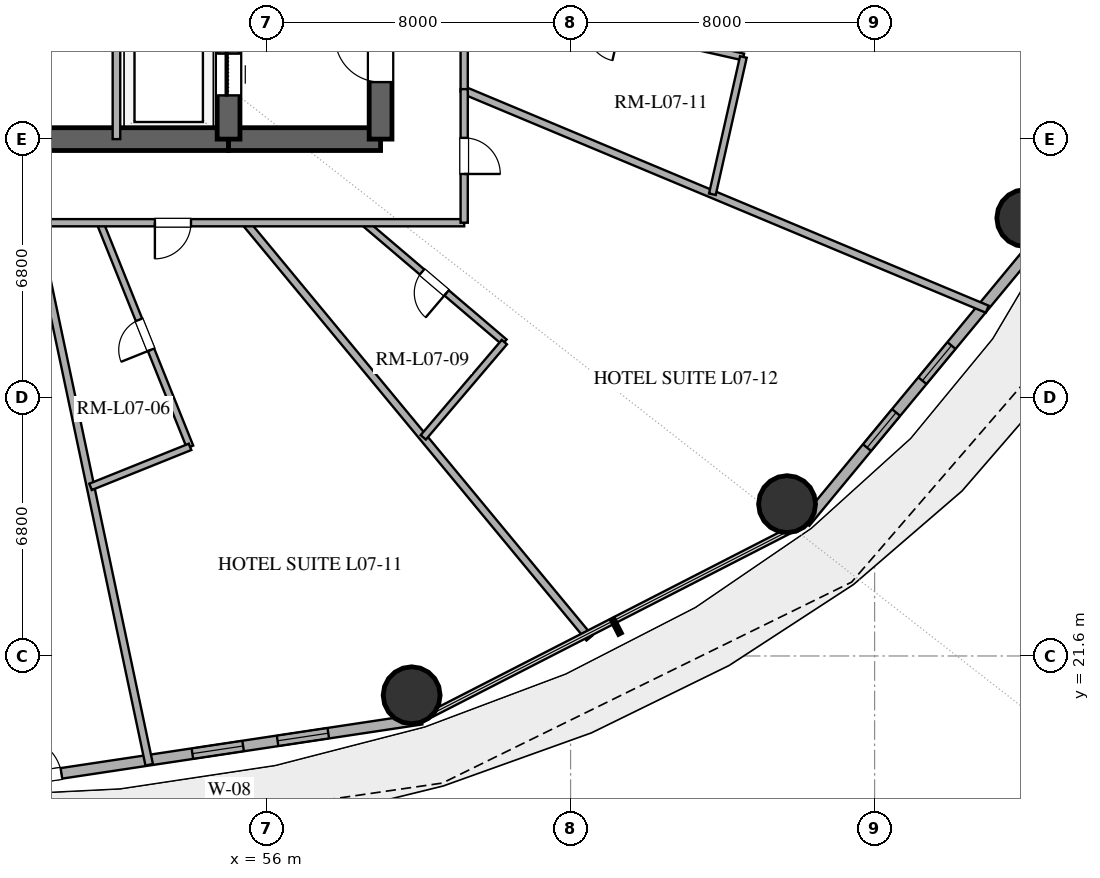
"""IFC4 building model, lengths in metres.
Left out: names, types, materials, properties, quantities, classifications, styles, units other than length and angle.
Written with IfcOpenShell. Run it as: python <this file> out.ifc"""

import sys

from ifc_helpers import new_model, si_unit, direction, frame, frame_2d, origin, origin_2d, place, context, subcontext, project, spatial, rectangle, hollow_circle, extrude, element, fill, save


model = new_model("IFC4")
c1 = context("Model", 3, precision=1e-05, world=origin(), true_north=direction((0.0, 1.0)))
c2 = subcontext(c1, "Body", "Model", "MODEL_VIEW")
j1 = project(units=[si_unit("LENGTHUNIT", "METRE"), si_unit("PLANEANGLEUNIT", "RADIAN")], contexts=[c1])
p1 = place(None, origin())
s1 = spatial("IfcSite", under=j1, at=p1, CompositionType="ELEMENT")
p2 = place(p1, origin())
s2 = spatial("IfcBuilding", under=s1, at=p2, CompositionType="ELEMENT")
p3 = place(p2, frame((0.0, 0.0, 35.4)))
s3 = spatial("IfcBuildingStorey", under=s2, at=p3, CompositionType="ELEMENT", Elevation=35.4)
p4 = place(p3, frame((41.0, 35.2, 0.0), z_axis=(0.0, 0.0, 1.0), x_axis=(1.0, 0.0, 0.0)))
e1 = element("IfcWall", 1, at=p4, inside=s3, PredefinedType="SHEAR", context=c2, shape_type="SweptSolid", body=[
    extrude(rectangle(XDim=14.0, YDim=0.6, at=frame_2d((7.0, 0.0))), origin(), (0.0, 0.0, 1.0), 3.38),
])
p5 = place(p4, frame((6.1, 0.0, 0.0)))
e2 = element("IfcOpeningElement", 2, at=p5, cuts=e1, PredefinedType="OPENING", context=c2, shape_type="SweptSolid", body=[
    extrude(rectangle(XDim=1.8, YDim=2.25, at=frame_2d((0.9, 1.125))), frame((0.0, 0.31, 0.0), z_axis=(0.0, -1.0, 0.0), x_axis=(1.0, 0.0, 0.0)), (0.0, 0.0, 1.0), 0.62),
])
p6 = place(p3, frame((55.0, 35.2, 0.0), z_axis=(0.0, 0.0, 1.0), x_axis=(1.0, 0.0, 0.0)))
e3 = element("IfcWall", 3, at=p6, inside=s3, PredefinedType="SHEAR", context=c2, shape_type="SweptSolid", body=[
    extrude(rectangle(XDim=4.0, YDim=0.6, at=frame_2d((2.0, 0.0))), origin(), (0.0, 0.0, 1.0), 3.38),
])
p7 = place(p3, frame((59.0, 35.2, 0.0), z_axis=(0.0, 0.0, 1.0), x_axis=(0.0, 1.0, 0.0)))
e4 = element("IfcWall", 4, at=p7, inside=s3, PredefinedType="SHEAR", context=c2, shape_type="SweptSolid", body=[
    extrude(rectangle(XDim=13.6, YDim=0.6, at=frame_2d((6.8, 0.0))), origin(), (0.0, 0.0, 1.0), 3.38),
])
p8 = place(p7, frame((1.5, 0.0, 0.0)))
e5 = element("IfcOpeningElement", 5, at=p8, cuts=e4, PredefinedType="OPENING", context=c2, shape_type="SweptSolid", body=[
    extrude(rectangle(XDim=1.2, YDim=2.15, at=frame_2d((0.6, 1.075))), frame((0.0, 0.31, 0.0), z_axis=(0.0, -1.0, 0.0), x_axis=(1.0, 0.0, 0.0)), (0.0, 0.0, 1.0), 0.62),
])
p9 = place(p3, frame((55.0, 35.2, 0.0), z_axis=(0.0, 0.0, 1.0), x_axis=(0.0, 1.0, 0.0)))
e6 = element("IfcWall", 6, at=p9, inside=s3, PredefinedType="SHEAR", context=c2, shape_type="SweptSolid", body=[
    extrude(rectangle(XDim=13.6, YDim=0.6, at=frame_2d((6.8, 0.0))), origin(), (0.0, 0.0, 1.0), 3.38),
])
p10 = place(p9, frame((1.15, 0.0, 0.0)))
e7 = element("IfcOpeningElement", 7, at=p10, cuts=e6, PredefinedType="OPENING", context=c2, shape_type="SweptSolid", body=[
    extrude(rectangle(XDim=1.1, YDim=2.2, at=frame_2d((0.55, 1.1))), frame((0.0, 0.31, 0.0), z_axis=(0.0, -1.0, 0.0), x_axis=(1.0, 0.0, 0.0)), (0.0, 0.0, 1.0), 0.62),
])
for number, where, z_axis, x_axis in (
    (8, (59.818, 20.566, 0.0), (0.0, 0.0, 1.0), (1.0, 0.0, 0.0)),
    (9, (69.697, 25.595, 0.0), (0.0, 0.0, 1.0), (1.0, 0.0, 0.0)),
    (10, (75.966, 33.122, 0.0), (0.0, 0.0, 1.0), (1.0, 0.0, 0.0)),
):
    element("IfcColumn", number, at=place(p3, frame(where, z_axis=z_axis, x_axis=x_axis)), inside=s3, PredefinedType="COLUMN", context=c2, shape_type="SweptSolid", body=[
        extrude(hollow_circle(Radius=0.75, WallThickness=0.04, at=origin_2d()), origin(), (0.0, 0.0, 1.0), 3.38),
    ])
p11 = place(p3, frame((48.0, 18.12, 0.0), z_axis=(0.0, 0.0, 1.0), x_axis=(0.988864835849, 0.148816452121, 0.0)))
e11 = element("IfcWall", 11, at=p11, inside=s3, PredefinedType="SOLIDWALL", context=c2, shape_type="SweptSolid", body=[
    extrude(rectangle(XDim=12.214, YDim=0.28, at=frame_2d((6.107, 0.0))), origin(), (0.0, 0.0, 1.0), 3.38),
])
p12 = place(p11, frame((1.531, 0.0, 0.0)))
e12 = element("IfcOpeningElement", 12, at=p12, cuts=e11, PredefinedType="OPENING", context=c2, shape_type="SweptSolid", body=[
    extrude(rectangle(XDim=1.1, YDim=2.25, at=frame_2d((0.55, 1.125))), frame((0.0, 0.15, 0.0), z_axis=(0.0, -1.0, 0.0), x_axis=(1.0, 0.0, 0.0)), (0.0, 0.0, 1.0), 0.3),
])
p13 = place(p11, frame((6.116, 0.0, 0.85)))
e13 = element("IfcOpeningElement", 13, at=p13, cuts=e11, PredefinedType="OPENING", context=c2, shape_type="SweptSolid", body=[
    extrude(rectangle(XDim=1.35, YDim=1.8, at=frame_2d((0.675, 0.9))), frame((0.0, 0.15, 0.0), z_axis=(0.0, -1.0, 0.0), x_axis=(1.0, 0.0, 0.0)), (0.0, 0.0, 1.0), 0.3),
])
p14 = place(p11, frame((8.383, 0.0, 0.85)))
e14 = element("IfcOpeningElement", 14, at=p14, cuts=e11, PredefinedType="OPENING", context=c2, shape_type="SweptSolid", body=[
    extrude(rectangle(XDim=1.35, YDim=1.8, at=frame_2d((0.675, 0.9))), frame((0.0, 0.15, 0.0), z_axis=(0.0, -1.0, 0.0), x_axis=(1.0, 0.0, 0.0)), (0.0, 0.0, 1.0), 0.3),
])
p15 = place(p3, frame((70.174, 25.114, 0.0), z_axis=(0.0, 0.0, 1.0), x_axis=(0.637296809613, 0.770618437657, 0.0)))
e15 = element("IfcWall", 15, at=p15, inside=s3, PredefinedType="SOLIDWALL", context=c2, shape_type="SweptSolid", body=[
    extrude(rectangle(XDim=10.053, YDim=0.28, at=frame_2d((5.027, 0.0))), origin(), (0.0, 0.0, 1.0), 3.38),
])
p16 = place(p15, frame((2.553, 0.0, 0.85)))
e16 = element("IfcOpeningElement", 16, at=p16, cuts=e15, PredefinedType="OPENING", context=c2, shape_type="SweptSolid", body=[
    extrude(rectangle(XDim=1.2, YDim=1.8, at=frame_2d((0.6, 0.9))), frame((0.0, 0.15, 0.0), z_axis=(0.0, -1.0, 0.0), x_axis=(1.0, 0.0, 0.0)), (0.0, 0.0, 1.0), 0.3),
])
p17 = place(p15, frame((4.839, 0.0, 0.85)))
e17 = element("IfcOpeningElement", 17, at=p17, cuts=e15, PredefinedType="OPENING", context=c2, shape_type="SweptSolid", body=[
    extrude(rectangle(XDim=1.2, YDim=1.8, at=frame_2d((0.6, 0.9))), frame((0.0, 0.15, 0.0), z_axis=(0.0, -1.0, 0.0), x_axis=(1.0, 0.0, 0.0)), (0.0, 0.0, 1.0), 0.3),
])
p18 = place(p3, frame((52.05, 35.2, 0.0), z_axis=(0.0, 0.0, 1.0), x_axis=(0.0, 1.0, 0.0)))
e18 = element("IfcWall", 18, at=p18, inside=s3, PredefinedType="SOLIDWALL", context=c2, shape_type="SweptSolid", body=[
    extrude(rectangle(XDim=3.2, YDim=0.2, at=frame_2d((1.6, 0.0))), origin(), (0.0, 0.0, 1.0), 2.74),
])
p19 = place(p3, frame((61.2, 36.48, 0.0), z_axis=(0.0, 0.0, 1.0), x_axis=(0.922585702004, -0.385792201136, 0.0)))
e19 = element("IfcWall", 19, at=p19, inside=s3, PredefinedType="PARTITIONING", context=c2, shape_type="SweptSolid", body=[
    extrude(rectangle(XDim=14.918, YDim=0.2, at=frame_2d((7.459, 0.0))), origin(), (0.0, 0.0, 1.0), 2.74),
])
p20 = place(p3, frame((68.547, 37.361, 0.0), z_axis=(0.0, 0.0, 1.0), x_axis=(-0.975442349969, 0.220254902072, 0.0)))
e20 = element("IfcWall", 20, at=p20, inside=s3, PredefinedType="PLUMBINGWALL", context=c2, shape_type="SweptSolid", body=[
    extrude(rectangle(XDim=7.532, YDim=0.18, at=frame_2d((3.766, 0.0))), origin(), (0.0, 0.0, 1.0), 2.74),
])
p21 = place(p20, frame((3.341, 0.0, 0.0)))
e21 = element("IfcOpeningElement", 21, at=p21, cuts=e20, PredefinedType="OPENING", context=c2, shape_type="SweptSolid", body=[
    extrude(rectangle(XDim=0.85, YDim=2.1, at=frame_2d((0.425, 1.05))), frame((0.0, 0.1, 0.0), z_axis=(0.0, -1.0, 0.0), x_axis=(1.0, 0.0, 0.0)), (0.0, 0.0, 1.0), 0.2),
])
p22 = place(p3, frame((49.9, 33.0, 0.0), z_axis=(0.0, 0.0, 1.0), x_axis=(0.206598790959, -0.97842574556, 0.0)))
e22 = element("IfcWall", 22, at=p22, inside=s3, PredefinedType="PARTITIONING", context=c2, shape_type="SweptSolid", body=[
    extrude(rectangle(XDim=14.576, YDim=0.2, at=frame_2d((7.288, 0.0))), origin(), (0.0, 0.0, 1.0), 2.74),
])
p23 = place(p3, frame((61.2, 51.0, 0.0), z_axis=(0.0, 0.0, 1.0), x_axis=(0.0, -1.0, 0.0)))
e23 = element("IfcWall", 23, at=p23, inside=s3, PredefinedType="PARTITIONING", context=c2, shape_type="SweptSolid", body=[
    extrude(rectangle(XDim=14.554, YDim=0.19, at=frame_2d((7.277, 0.0))), origin(), (0.0, 0.0, 1.0), 2.74),
])
p24 = place(p23, frame((3.684, 0.0, 0.0)))
e24 = element("IfcOpeningElement", 24, at=p24, cuts=e23, PredefinedType="OPENING", context=c2, shape_type="SweptSolid", body=[
    extrude(rectangle(XDim=1.0, YDim=2.2, at=frame_2d((0.5, 1.1))), frame((0.0, 0.105, 0.0), z_axis=(0.0, -1.0, 0.0), x_axis=(1.0, 0.0, 0.0)), (0.0, 0.0, 1.0), 0.21),
])
p25 = place(p23, frame((9.438, 0.0, 0.0)))
e25 = element("IfcOpeningElement", 25, at=p25, cuts=e23, PredefinedType="OPENING", context=c2, shape_type="SweptSolid", body=[
    extrude(rectangle(XDim=0.95, YDim=2.15, at=frame_2d((0.475, 1.075))), frame((0.0, 0.105, 0.0), z_axis=(0.0, -1.0, 0.0), x_axis=(1.0, 0.0, 0.0)), (0.0, 0.0, 1.0), 0.21),
])
p26 = place(p3, frame((55.449, 33.0, 0.0), z_axis=(0.0, 0.0, 1.0), x_axis=(0.637638501905, -0.770335732579, 0.0)))
e26 = element("IfcWall", 26, at=p26, inside=s3, PredefinedType="PARTITIONING", context=c2, shape_type="SweptSolid", body=[
    extrude(rectangle(XDim=14.187, YDim=0.2, at=frame_2d((7.094, 0.0))), origin(), (0.0, 0.0, 1.0), 2.74),
])
p27 = place(p3, frame((53.987, 27.102, 0.0), z_axis=(0.0, 0.0, 1.0), x_axis=(-0.37285379951, 0.927890103509, 0.0)))
e27 = element("IfcWall", 27, at=p27, inside=s3, PredefinedType="PLUMBINGWALL", context=c2, shape_type="SweptSolid", body=[
    extrude(rectangle(XDim=6.356, YDim=0.18, at=frame_2d((3.178, 0.0))), origin(), (0.0, 0.0, 1.0), 2.74),
])
p28 = place(p27, frame((2.753, 0.0, 0.0)))
e28 = element("IfcOpeningElement", 28, at=p28, cuts=e27, PredefinedType="OPENING", context=c2, shape_type="SweptSolid", body=[
    extrude(rectangle(XDim=0.85, YDim=2.1, at=frame_2d((0.425, 1.05))), frame((0.0, 0.1, 0.0), z_axis=(0.0, -1.0, 0.0), x_axis=(1.0, 0.0, 0.0)), (0.0, 0.0, 1.0), 0.2),
])
p29 = place(p3, frame((62.258, 29.859, 0.0), z_axis=(0.0, 0.0, 1.0), x_axis=(-0.761358380859, 0.648331254758, 0.0)))
e29 = element("IfcWall", 29, at=p29, inside=s3, PredefinedType="PLUMBINGWALL", context=c2, shape_type="SweptSolid", body=[
    extrude(rectangle(XDim=4.845, YDim=0.18, at=frame_2d((2.422, 0.0))), origin(), (0.0, 0.0, 1.0), 2.74),
])
p30 = place(p29, frame((1.997, 0.0, 0.0)))
e30 = element("IfcOpeningElement", 30, at=p30, cuts=e29, PredefinedType="OPENING", context=c2, shape_type="SweptSolid", body=[
    extrude(rectangle(XDim=0.85, YDim=2.1, at=frame_2d((0.425, 1.05))), frame((0.0, 0.1, 0.0), z_axis=(0.0, -1.0, 0.0), x_axis=(1.0, 0.0, 0.0)), (0.0, 0.0, 1.0), 0.2),
])
p31 = place(p3, frame((61.2, 33.0, 0.0), z_axis=(0.0, 0.0, 1.0), x_axis=(-1.0, 0.0, 0.0)))
e31 = element("IfcWall", 31, at=p31, inside=s3, PredefinedType="PARTITIONING", context=c2, shape_type="SweptSolid", body=[
    extrude(rectangle(XDim=11.3, YDim=0.19, at=frame_2d((5.65, 0.0))), origin(), (0.0, 0.0, 1.0), 2.74),
])
p32 = place(p31, frame((7.188, 0.0, 0.0)))
e32 = element("IfcOpeningElement", 32, at=p32, cuts=e31, PredefinedType="OPENING", context=c2, shape_type="SweptSolid", body=[
    extrude(rectangle(XDim=0.95, YDim=2.15, at=frame_2d((0.475, 1.075))), frame((0.0, 0.105, 0.0), z_axis=(0.0, -1.0, 0.0), x_axis=(1.0, 0.0, 0.0)), (0.0, 0.0, 1.0), 0.21),
])
p33 = place(p3, frame((67.731, 33.749, 0.0), z_axis=(0.0, 0.0, 1.0), x_axis=(0.220238608567, 0.9754460289, 0.0)))
e33 = element("IfcWall", 33, at=p33, inside=s3, PredefinedType="PLUMBINGWALL", context=c2, shape_type="SweptSolid", body=[
    extrude(rectangle(XDim=3.702, YDim=0.18, at=frame_2d((1.851, 0.0))), origin(), (0.0, 0.0, 1.0), 2.74),
])
p34 = place(p3, frame((61.2, 36.515, 0.0), z_axis=(0.0, 0.0, 1.0), x_axis=(0.0, -1.0, 0.0)))
e34 = element("IfcWall", 34, at=p34, inside=s3, PredefinedType="PARTITIONING", context=c2, shape_type="SweptSolid", body=[
    extrude(rectangle(XDim=3.515, YDim=0.19, at=frame_2d((1.758, 0.0))), origin(), (0.0, 0.0, 1.0), 2.74),
])
p35 = place(p34, frame((1.282, 0.0, 0.0)))
e35 = element("IfcOpeningElement", 35, at=p35, cuts=e34, PredefinedType="OPENING", context=c2, shape_type="SweptSolid", body=[
    extrude(rectangle(XDim=0.95, YDim=2.15, at=frame_2d((0.475, 1.075))), frame((0.0, 0.105, 0.0), z_axis=(0.0, -1.0, 0.0), x_axis=(1.0, 0.0, 0.0)), (0.0, 0.0, 1.0), 0.21),
])
p36 = place(p3, frame((60.124, 27.353, 0.0), z_axis=(0.0, 0.0, 1.0), x_axis=(0.648326357453, 0.76136255111, 0.0)))
e36 = element("IfcWall", 36, at=p36, inside=s3, PredefinedType="PLUMBINGWALL", context=c2, shape_type="SweptSolid", body=[
    extrude(rectangle(XDim=3.292, YDim=0.18, at=frame_2d((1.646, 0.0))), origin(), (0.0, 0.0, 1.0), 2.74),
])
p37 = place(p3, frame((51.368, 26.05, 0.0), z_axis=(0.0, 0.0, 1.0), x_axis=(0.927890861741, 0.372851912558, 0.0)))
e37 = element("IfcWall", 37, at=p37, inside=s3, PredefinedType="PLUMBINGWALL", context=c2, shape_type="SweptSolid", body=[
    extrude(rectangle(XDim=2.822, YDim=0.18, at=frame_2d((1.411, 0.0))), origin(), (0.0, 0.0, 1.0), 2.74),
])
p38 = place(p12, origin())
e38 = element("IfcDoor", 38, at=p38, inside=s3, OperationType="SINGLE_SWING_LEFT", PredefinedType="DOOR", context=c2, shape_type="SweptSolid", body=[
    extrude(rectangle(XDim=1.1, YDim=2.25, at=frame_2d((0.55, 1.125))), frame((0.0, 0.025, 0.0), z_axis=(0.0, -1.0, 0.0), x_axis=(1.0, 0.0, 0.0)), (0.0, 0.0, 1.0), 0.05),
])
fill(e12, e38)
p39 = place(p13, origin())
e39 = element("IfcWindow", 39, at=p39, inside=s3, PartitioningType="SINGLE_PANEL", PredefinedType="WINDOW", context=c2, shape_type="SweptSolid", body=[
    extrude(rectangle(XDim=1.35, YDim=1.8, at=frame_2d((0.675, 0.9))), frame((0.0, 0.03, 0.0), z_axis=(0.0, -1.0, 0.0), x_axis=(1.0, 0.0, 0.0)), (0.0, 0.0, 1.0), 0.06),
])
fill(e13, e39)
p40 = place(p14, origin())
e40 = element("IfcWindow", 40, at=p40, inside=s3, PartitioningType="SINGLE_PANEL", PredefinedType="WINDOW", context=c2, shape_type="SweptSolid", body=[
    extrude(rectangle(XDim=1.35, YDim=1.8, at=frame_2d((0.675, 0.9))), frame((0.0, 0.03, 0.0), z_axis=(0.0, -1.0, 0.0), x_axis=(1.0, 0.0, 0.0)), (0.0, 0.0, 1.0), 0.06),
])
fill(e14, e40)
p41 = place(p16, origin())
e41 = element("IfcWindow", 41, at=p41, inside=s3, PartitioningType="SINGLE_PANEL", PredefinedType="WINDOW", context=c2, shape_type="SweptSolid", body=[
    extrude(rectangle(XDim=1.2, YDim=1.8, at=frame_2d((0.6, 0.9))), frame((0.0, 0.03, 0.0), z_axis=(0.0, -1.0, 0.0), x_axis=(1.0, 0.0, 0.0)), (0.0, 0.0, 1.0), 0.06),
])
fill(e16, e41)
p42 = place(p17, origin())
e42 = element("IfcWindow", 42, at=p42, inside=s3, PartitioningType="SINGLE_PANEL", PredefinedType="WINDOW", context=c2, shape_type="SweptSolid", body=[
    extrude(rectangle(XDim=1.2, YDim=1.8, at=frame_2d((0.6, 0.9))), frame((0.0, 0.03, 0.0), z_axis=(0.0, -1.0, 0.0), x_axis=(1.0, 0.0, 0.0)), (0.0, 0.0, 1.0), 0.06),
])
fill(e17, e42)
p43 = place(p10, origin())
e43 = element("IfcDoor", 43, at=p43, inside=s3, OperationType="SLIDING_TO_RIGHT", PredefinedType="DOOR", context=c2, shape_type="SweptSolid", body=[
    extrude(rectangle(XDim=1.1, YDim=2.2, at=frame_2d((0.55, 1.1))), frame((0.0, 0.025, 0.0), z_axis=(0.0, -1.0, 0.0), x_axis=(1.0, 0.0, 0.0)), (0.0, 0.0, 1.0), 0.05),
])
fill(e7, e43)
p44 = place(p8, origin())
e44 = element("IfcDoor", 44, at=p44, inside=s3, OperationType="SINGLE_SWING_RIGHT", PredefinedType="DOOR", context=c2, shape_type="SweptSolid", body=[
    extrude(rectangle(XDim=1.2, YDim=2.15, at=frame_2d((0.6, 1.075))), frame((0.0, 0.025, 0.0), z_axis=(0.0, -1.0, 0.0), x_axis=(1.0, 0.0, 0.0)), (0.0, 0.0, 1.0), 0.05),
])
fill(e5, e44)
p45 = place(p28, origin())
e45 = element("IfcDoor", 45, at=p45, inside=s3, OperationType="SINGLE_SWING_LEFT", PredefinedType="DOOR", context=c2, shape_type="SweptSolid", body=[
    extrude(rectangle(XDim=0.85, YDim=2.1, at=frame_2d((0.425, 1.05))), frame((0.0, 0.025, 0.0), z_axis=(0.0, -1.0, 0.0), x_axis=(1.0, 0.0, 0.0)), (0.0, 0.0, 1.0), 0.05),
])
fill(e28, e45)
p46 = place(p30, origin())
e46 = element("IfcDoor", 46, at=p46, inside=s3, OperationType="SINGLE_SWING_LEFT", PredefinedType="DOOR", context=c2, shape_type="SweptSolid", body=[
    extrude(rectangle(XDim=0.85, YDim=2.1, at=frame_2d((0.425, 1.05))), frame((0.0, 0.025, 0.0), z_axis=(0.0, -1.0, 0.0), x_axis=(1.0, 0.0, 0.0)), (0.0, 0.0, 1.0), 0.05),
])
fill(e30, e46)
p47 = place(p32, origin())
e47 = element("IfcDoor", 47, at=p47, inside=s3, OperationType="SINGLE_SWING_RIGHT", PredefinedType="DOOR", context=c2, shape_type="SweptSolid", body=[
    extrude(rectangle(XDim=0.95, YDim=2.15, at=frame_2d((0.475, 1.075))), frame((0.0, 0.025, 0.0), z_axis=(0.0, -1.0, 0.0), x_axis=(1.0, 0.0, 0.0)), (0.0, 0.0, 1.0), 0.05),
])
fill(e32, e47)
p48 = place(p35, origin())
e48 = element("IfcDoor", 48, at=p48, inside=s3, OperationType="SINGLE_SWING_RIGHT", PredefinedType="DOOR", context=c2, shape_type="SweptSolid", body=[
    extrude(rectangle(XDim=0.95, YDim=2.15, at=frame_2d((0.475, 1.075))), frame((0.0, 0.025, 0.0), z_axis=(0.0, -1.0, 0.0), x_axis=(1.0, 0.0, 0.0)), (0.0, 0.0, 1.0), 0.05),
])
fill(e35, e48)
save(model, sys.argv[1])
